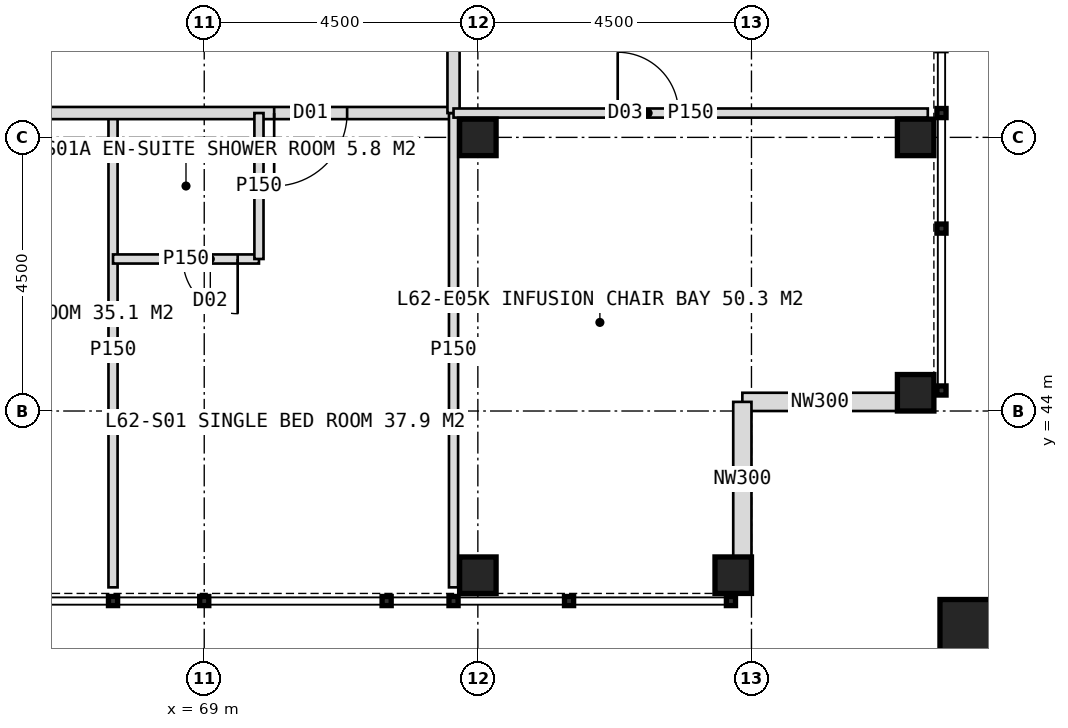
"""IFC4 building model, lengths in metres.
Left out: names, types, materials, properties, quantities, classifications, styles, units other than length and angle.
Written with IfcOpenShell. Run it as: python <this file> out.ifc"""

import sys

from ifc_helpers import new_model, si_unit, direction, frame, frame_2d, origin, origin_2d, place, context, subcontext, project, spatial, rectangle, hollow_rectangle, extrude, element, fill, save


model = new_model("IFC4")
c1 = context("Model", 3, precision=1e-05, world=origin(), true_north=direction((0.0, 1.0)))
c2 = subcontext(c1, "Body", "Model", "MODEL_VIEW")
j1 = project(units=[si_unit("LENGTHUNIT", "METRE"), si_unit("PLANEANGLEUNIT", "RADIAN")], contexts=[c1])
p1 = place(None, origin())
s1 = spatial("IfcSite", under=j1, at=p1, CompositionType="ELEMENT")
p2 = place(p1, origin())
s2 = spatial("IfcBuilding", under=s1, at=p2, CompositionType="ELEMENT")
p3 = place(p2, frame((0.0, 0.0, 258.0)))
s3 = spatial("IfcBuildingStorey", under=s2, at=p3, CompositionType="ELEMENT", Elevation=258.0)
for number, where, z_axis, x_axis in (
    (1, (73.5, 48.5, 0.0), (0.0, 0.0, 1.0), (1.0, 0.0, 0.0)),
    (2, (80.7, 44.3, 0.0), (0.0, 0.0, 1.0), (1.0, 0.0, 0.0)),
    (3, (80.7, 48.5, 0.0), (0.0, 0.0, 1.0), (1.0, 0.0, 0.0)),
    (4, (73.5, 41.3, 0.0), (0.0, 0.0, 1.0), (1.0, 0.0, 0.0)),
    (5, (77.7, 41.3, 0.0), (0.0, 0.0, 1.0), (1.0, 0.0, 0.0)),
):
    element("IfcColumn", number, at=place(p3, frame(where, z_axis=z_axis, x_axis=x_axis)), inside=s3, PredefinedType="COLUMN", context=c2, shape_type="SweptSolid", body=[
        extrude(hollow_rectangle(XDim=0.6, YDim=0.6, WallThickness=0.04, at=origin_2d()), origin(), (0.0, 0.0, 1.0), 4.0),
    ])
p4 = place(p3, frame((81.6, 40.4, 0.0), z_axis=(0.0, 0.0, 1.0), x_axis=(1.0, 0.0, 0.0)))
e6 = element("IfcColumn", 6, at=p4, inside=s3, PredefinedType="COLUMN", context=c2, shape_type="SweptSolid", body=[
    extrude(hollow_rectangle(XDim=1.0, YDim=1.0, WallThickness=0.06, at=origin_2d()), origin(), (0.0, 0.0, 1.0), 4.0),
])
for number, where, z_axis, x_axis in (
    (7, (80.4, 44.15, 0.0), (0.0, 0.0, 1.0), (-1.0, 0.0, 0.0)),
    (8, (77.85, 44.15, 0.0), (0.0, 0.0, 1.0), (0.0, -1.0, 0.0)),
):
    element("IfcWall", number, at=place(p3, frame(where, z_axis=z_axis, x_axis=x_axis)), inside=s3, PredefinedType="ELEMENTEDWALL", context=c2, shape_type="SweptSolid", body=[
        extrude(rectangle(XDim=2.55, YDim=0.3, at=frame_2d((1.275, 0.0))), origin(), (0.0, 0.0, 1.0), 2.95),
    ])
p5 = place(p3, frame((67.5, 48.9, 0.0), z_axis=(0.0, 0.0, 1.0), x_axis=(0.0, -1.0, 0.0)))
e9 = element("IfcWall", 9, at=p5, inside=s3, PredefinedType="PARTITIONING", context=c2, shape_type="SweptSolid", body=[
    extrude(rectangle(XDim=7.8, YDim=0.15, at=frame_2d((3.9, 0.0))), origin(), (0.0, 0.0, 1.0), 3.75),
])
p6 = place(p3, frame((73.1, 48.9, 0.0), z_axis=(0.0, 0.0, 1.0), x_axis=(-1.0, 0.0, 0.0)))
e10 = element("IfcWall", 10, at=p6, inside=s3, PredefinedType="PARTITIONING", context=c2, shape_type="SweptSolid", body=[
    extrude(rectangle(XDim=26.2, YDim=0.2, at=frame_2d((13.1, 0.0))), origin(), (0.0, 0.0, 1.0), 3.75),
])
p7 = place(p6, frame((1.75, 0.0, 0.0)))
e11 = element("IfcOpeningElement", 11, at=p7, cuts=e10, PredefinedType="OPENING", context=c2, shape_type="SweptSolid", body=[
    extrude(rectangle(XDim=1.2, YDim=2.2, at=frame_2d((0.6, 1.1))), frame((0.0, 0.11, 0.0), z_axis=(0.0, -1.0, 0.0), x_axis=(1.0, 0.0, 0.0)), (0.0, 0.0, 1.0), 0.22),
])
p8 = place(p6, frame((6.75, 0.0, 0.0)))
e12 = element("IfcOpeningElement", 12, at=p8, cuts=e10, PredefinedType="OPENING", context=c2, shape_type="SweptSolid", body=[
    extrude(rectangle(XDim=1.0, YDim=2.1, at=frame_2d((0.5, 1.05))), frame((0.0, 0.11, 0.0), z_axis=(0.0, -1.0, 0.0), x_axis=(1.0, 0.0, 0.0)), (0.0, 0.0, 1.0), 0.22),
])
p9 = place(p6, frame((11.1, 0.0, 0.0)))
e13 = element("IfcOpeningElement", 13, at=p9, cuts=e10, PredefinedType="OPENING", context=c2, shape_type="SweptSolid", body=[
    extrude(rectangle(XDim=1.0, YDim=2.1, at=frame_2d((0.5, 1.05))), frame((0.0, 0.11, 0.0), z_axis=(0.0, -1.0, 0.0), x_axis=(1.0, 0.0, 0.0)), (0.0, 0.0, 1.0), 0.22),
])
p10 = place(p6, frame((14.1, 0.0, 0.0)))
e14 = element("IfcOpeningElement", 14, at=p10, cuts=e10, PredefinedType="OPENING", context=c2, shape_type="SweptSolid", body=[
    extrude(rectangle(XDim=1.0, YDim=2.1, at=frame_2d((0.5, 1.05))), frame((0.0, 0.11, 0.0), z_axis=(0.0, -1.0, 0.0), x_axis=(1.0, 0.0, 0.0)), (0.0, 0.0, 1.0), 0.22),
])
p11 = place(p6, frame((18.45, 0.0, 0.0)))
e15 = element("IfcOpeningElement", 15, at=p11, cuts=e10, PredefinedType="OPENING", context=c2, shape_type="SweptSolid", body=[
    extrude(rectangle(XDim=1.0, YDim=2.1, at=frame_2d((0.5, 1.05))), frame((0.0, 0.11, 0.0), z_axis=(0.0, -1.0, 0.0), x_axis=(1.0, 0.0, 0.0)), (0.0, 0.0, 1.0), 0.22),
])
p12 = place(p6, frame((22.9, 0.0, 0.0)))
e16 = element("IfcOpeningElement", 16, at=p12, cuts=e10, PredefinedType="OPENING", context=c2, shape_type="SweptSolid", body=[
    extrude(rectangle(XDim=1.0, YDim=2.1, at=frame_2d((0.5, 1.05))), frame((0.0, 0.11, 0.0), z_axis=(0.0, -1.0, 0.0), x_axis=(1.0, 0.0, 0.0)), (0.0, 0.0, 1.0), 0.22),
])
p13 = place(p3, frame((73.1, 48.9, 0.0), z_axis=(0.0, 0.0, 1.0), x_axis=(0.0, -1.0, 0.0)))
e17 = element("IfcWall", 17, at=p13, inside=s3, PredefinedType="PARTITIONING", context=c2, shape_type="SweptSolid", body=[
    extrude(rectangle(XDim=7.8, YDim=0.15, at=frame_2d((3.9, 0.0))), origin(), (0.0, 0.0, 1.0), 3.75),
])
p14 = place(p3, frame((69.9, 46.5, 0.0), z_axis=(0.0, 0.0, 1.0), x_axis=(-1.0, 0.0, 0.0)))
e18 = element("IfcWall", 18, at=p14, inside=s3, PredefinedType="PARTITIONING", context=c2, shape_type="SweptSolid", body=[
    extrude(rectangle(XDim=2.4, YDim=0.15, at=frame_2d((1.2, 0.0))), origin(), (0.0, 0.0, 1.0), 3.75),
])
p15 = place(p14, frame((0.35, 0.0, 0.0)))
e19 = element("IfcOpeningElement", 19, at=p15, cuts=e18, PredefinedType="OPENING", context=c2, shape_type="SweptSolid", body=[
    extrude(rectangle(XDim=0.9, YDim=2.1, at=frame_2d((0.45, 1.05))), frame((0.0, 0.085, 0.0), z_axis=(0.0, -1.0, 0.0), x_axis=(1.0, 0.0, 0.0)), (0.0, 0.0, 1.0), 0.17),
])
p16 = place(p3, frame((69.9, 48.9, 0.0), z_axis=(0.0, 0.0, 1.0), x_axis=(0.0, -1.0, 0.0)))
e20 = element("IfcWall", 20, at=p16, inside=s3, PredefinedType="PARTITIONING", context=c2, shape_type="SweptSolid", body=[
    extrude(rectangle(XDim=2.4, YDim=0.15, at=frame_2d((1.2, 0.0))), origin(), (0.0, 0.0, 1.0), 3.75),
])
p17 = place(p3, frame((73.1, 71.0, 0.0), z_axis=(0.0, 0.0, 1.0), x_axis=(0.0, -1.0, 0.0)))
e21 = element("IfcWall", 21, at=p17, inside=s3, PredefinedType="PARTITIONING", context=c2, shape_type="SweptSolid", body=[
    extrude(rectangle(XDim=22.1, YDim=0.2, at=frame_2d((11.05, 0.0))), origin(), (0.0, 0.0, 1.0), 3.75),
])
p18 = place(p17, frame((2.65, 0.0, 0.0)))
e22 = element("IfcOpeningElement", 22, at=p18, cuts=e21, PredefinedType="OPENING", context=c2, shape_type="SweptSolid", body=[
    extrude(rectangle(XDim=1.0, YDim=2.1, at=frame_2d((0.5, 1.05))), frame((0.0, 0.11, 0.0), z_axis=(0.0, -1.0, 0.0), x_axis=(1.0, 0.0, 0.0)), (0.0, 0.0, 1.0), 0.22),
])
p19 = place(p17, frame((7.0, 0.0, 0.0)))
e23 = element("IfcOpeningElement", 23, at=p19, cuts=e21, PredefinedType="OPENING", context=c2, shape_type="SweptSolid", body=[
    extrude(rectangle(XDim=1.0, YDim=2.1, at=frame_2d((0.5, 1.05))), frame((0.0, 0.11, 0.0), z_axis=(0.0, -1.0, 0.0), x_axis=(1.0, 0.0, 0.0)), (0.0, 0.0, 1.0), 0.22),
])
p20 = place(p17, frame((14.35, 0.0, 0.0)))
e24 = element("IfcOpeningElement", 24, at=p20, cuts=e21, PredefinedType="OPENING", context=c2, shape_type="SweptSolid", body=[
    extrude(rectangle(XDim=1.2, YDim=2.2, at=frame_2d((0.6, 1.1))), frame((0.0, 0.11, 0.0), z_axis=(0.0, -1.0, 0.0), x_axis=(1.0, 0.0, 0.0)), (0.0, 0.0, 1.0), 0.22),
])
p21 = place(p17, frame((19.15, 0.0, 0.0)))
e25 = element("IfcOpeningElement", 25, at=p21, cuts=e21, PredefinedType="OPENING", context=c2, shape_type="SweptSolid", body=[
    extrude(rectangle(XDim=1.2, YDim=2.2, at=frame_2d((0.6, 1.1))), frame((0.0, 0.11, 0.0), z_axis=(0.0, -1.0, 0.0), x_axis=(1.0, 0.0, 0.0)), (0.0, 0.0, 1.0), 0.22),
])
p22 = place(p3, frame((73.1, 48.9, 0.0), z_axis=(0.0, 0.0, 1.0), x_axis=(1.0, 0.0, 0.0)))
e26 = element("IfcWall", 26, at=p22, inside=s3, PredefinedType="PARTITIONING", context=c2, shape_type="SweptSolid", body=[
    extrude(rectangle(XDim=7.8, YDim=0.15, at=frame_2d((3.9, 0.0))), origin(), (0.0, 0.0, 1.0), 3.75),
])
p23 = place(p22, frame((2.7, 0.0, 0.0)))
e27 = element("IfcOpeningElement", 27, at=p23, cuts=e26, PredefinedType="OPENING", context=c2, shape_type="SweptSolid", body=[
    extrude(rectangle(XDim=1.0, YDim=2.1, at=frame_2d((0.5, 1.05))), frame((0.0, 0.085, 0.0), z_axis=(0.0, -1.0, 0.0), x_axis=(1.0, 0.0, 0.0)), (0.0, 0.0, 1.0), 0.17),
])
p24 = place(p7, origin())
e28 = element("IfcDoor", 28, at=p24, inside=s3, OperationType="SINGLE_SWING_RIGHT", PredefinedType="DOOR", context=c2, shape_type="SweptSolid", body=[
    extrude(rectangle(XDim=1.2, YDim=2.2, at=frame_2d((0.6, 1.1))), frame((0.0, 0.025, 0.0), z_axis=(0.0, -1.0, 0.0), x_axis=(1.0, 0.0, 0.0)), (0.0, 0.0, 1.0), 0.05),
])
fill(e11, e28)
p25 = place(p15, origin())
e29 = element("IfcDoor", 29, at=p25, inside=s3, OperationType="SINGLE_SWING_LEFT", PredefinedType="DOOR", context=c2, shape_type="SweptSolid", body=[
    extrude(rectangle(XDim=0.9, YDim=2.1, at=frame_2d((0.45, 1.05))), frame((0.0, 0.025, 0.0), z_axis=(0.0, -1.0, 0.0), x_axis=(1.0, 0.0, 0.0)), (0.0, 0.0, 1.0), 0.05),
])
fill(e19, e29)
p26 = place(p23, origin())
e30 = element("IfcDoor", 30, at=p26, inside=s3, OperationType="SINGLE_SWING_LEFT", PredefinedType="DOOR", context=c2, shape_type="SweptSolid", body=[
    extrude(rectangle(XDim=1.0, YDim=2.1, at=frame_2d((0.5, 1.05))), frame((0.0, 0.025, 0.0), z_axis=(0.0, -1.0, 0.0), x_axis=(1.0, 0.0, 0.0)), (0.0, 0.0, 1.0), 0.05),
])
fill(e27, e30)
save(model, sys.argv[1])
